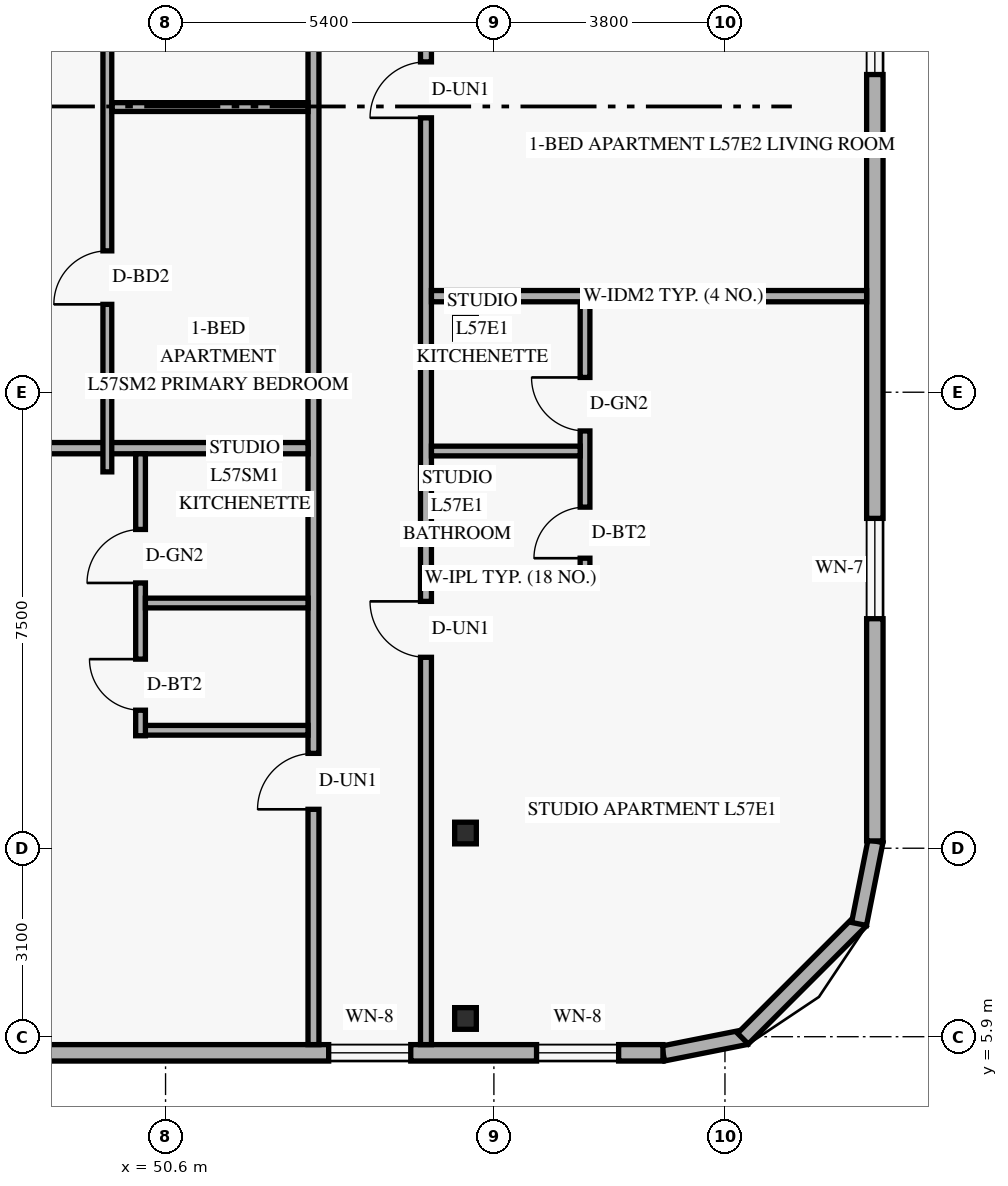
"""IFC4 building model, lengths in metres.
Left out: names, types, materials, properties, quantities, classifications, styles, units other than length and angle.
Written with IfcOpenShell. Run it as: python <this file> out.ifc"""

import sys

from ifc_helpers import new_model, si_unit, direction, frame, frame_2d, origin, origin_2d, place, context, subcontext, project, spatial, rectangle, hollow_rectangle, extrude, element, fill, save


model = new_model("IFC4")
c1 = context("Model", 3, precision=1e-05, world=origin(), true_north=direction((0.0, 1.0)))
c2 = subcontext(c1, "Body", "Model", "MODEL_VIEW")
j1 = project(units=[si_unit("LENGTHUNIT", "METRE"), si_unit("PLANEANGLEUNIT", "RADIAN")], contexts=[c1])
p1 = place(None, origin())
s1 = spatial("IfcSite", under=j1, at=p1, CompositionType="ELEMENT")
p2 = place(p1, origin())
s2 = spatial("IfcBuilding", under=s1, at=p2, CompositionType="ELEMENT")
p3 = place(p2, frame((0.0, 0.0, 220.2)))
s3 = spatial("IfcBuildingStorey", under=s2, at=p3, CompositionType="ELEMENT", Elevation=220.2)
for number, where, z_axis, x_axis in (
    (1, (55.428, 6.2, 0.0), (0.058, 0.0, 0.998), (0.0, 1.0, 0.0)),
    (2, (55.428, 9.25, 0.0), (0.058, 0.0, 0.998), (0.0, 1.0, 0.0)),
    (3, (55.428, 17.55, 0.0), (0.058, 0.0, 0.998), (0.0, 1.0, 0.0)),
):
    element("IfcColumn", number, at=place(p3, frame(where, z_axis=z_axis, x_axis=x_axis)), inside=s3, PredefinedType="COLUMN", context=c2, shape_type="SweptSolid", body=[
        extrude(hollow_rectangle(XDim=0.356, YDim=0.356, WallThickness=0.016, at=origin_2d()), origin(), (0.0, 0.0, 1.0), 3.606),
    ])
p4 = place(p3, frame((58.783, 5.624, 0.0), z_axis=(0.0, 0.0, 1.0), x_axis=(0.980809899341, 0.19496651342, 0.0)))
e4 = element("IfcWall", 4, at=p4, inside=s3, PredefinedType="SOLIDWALL", context=c2, shape_type="SweptSolid", body=[
    extrude(rectangle(XDim=1.389, YDim=0.25, at=frame_2d((0.694, 0.0))), origin(), (0.0, 0.0, 1.0), 3.36),
])
p5 = place(p3, frame((60.095, 5.868, 0.0), z_axis=(0.0, 0.0, 1.0), x_axis=(0.707106781187, 0.707106781187, 0.0)))
e5 = element("IfcWall", 5, at=p5, inside=s3, PredefinedType="SOLIDWALL", context=c2, shape_type="SweptSolid", body=[
    extrude(rectangle(XDim=2.739, YDim=0.25, at=frame_2d((1.37, 0.0))), origin(), (0.0, 0.0, 1.0), 3.36),
])
p6 = place(p3, frame((62.005, 7.754, 0.0), z_axis=(0.0, 0.0, 1.0), x_axis=(0.195135625965, 0.9807762678, 0.0)))
e6 = element("IfcWall", 6, at=p6, inside=s3, PredefinedType="SOLIDWALL", context=c2, shape_type="SweptSolid", body=[
    extrude(rectangle(XDim=1.389, YDim=0.25, at=frame_2d((0.694, 0.0))), origin(), (0.0, 0.0, 1.0), 3.36),
])
p7 = place(p3, frame((25.82, 5.635, 0.0), z_axis=(0.0, 0.0, 1.0), x_axis=(1.0, 0.0, 0.0)))
e7 = element("IfcWall", 7, at=p7, inside=s3, PredefinedType="SOLIDWALL", context=c2, shape_type="SweptSolid", body=[
    extrude(rectangle(XDim=32.96, YDim=0.27, at=frame_2d((16.48, 0.0))), origin(), (0.0, 0.0, 1.0), 3.36),
])
p8 = place(p7, frame((3.795, 0.0, 0.85)))
e8 = element("IfcOpeningElement", 8, at=p8, cuts=e7, PredefinedType="OPENING", context=c2, shape_type="SweptSolid", body=[
    extrude(rectangle(XDim=1.35, YDim=1.55, at=frame_2d((0.675, 0.775))), frame((0.0, 0.145, 0.0), z_axis=(0.0, -1.0, 0.0), x_axis=(1.0, 0.0, 0.0)), (0.0, 0.0, 1.0), 0.29),
])
p9 = place(p7, frame((16.313, 0.0, 0.85)))
e9 = element("IfcOpeningElement", 9, at=p9, cuts=e7, PredefinedType="OPENING", context=c2, shape_type="SweptSolid", body=[
    extrude(rectangle(XDim=1.35, YDim=1.55, at=frame_2d((0.675, 0.775))), frame((0.0, 0.145, 0.0), z_axis=(0.0, -1.0, 0.0), x_axis=(1.0, 0.0, 0.0)), (0.0, 0.0, 1.0), 0.29),
])
p10 = place(p7, frame((27.463, 0.0, 0.85)))
e10 = element("IfcOpeningElement", 10, at=p10, cuts=e7, PredefinedType="OPENING", context=c2, shape_type="SweptSolid", body=[
    extrude(rectangle(XDim=1.35, YDim=1.55, at=frame_2d((0.675, 0.775))), frame((0.0, 0.145, 0.0), z_axis=(0.0, -1.0, 0.0), x_axis=(1.0, 0.0, 0.0)), (0.0, 0.0, 1.0), 0.29),
])
p11 = place(p7, frame((30.881, 0.0, 0.85)))
e11 = element("IfcOpeningElement", 11, at=p11, cuts=e7, PredefinedType="OPENING", context=c2, shape_type="SweptSolid", body=[
    extrude(rectangle(XDim=1.35, YDim=1.55, at=frame_2d((0.675, 0.775))), frame((0.0, 0.145, 0.0), z_axis=(0.0, -1.0, 0.0), x_axis=(1.0, 0.0, 0.0)), (0.0, 0.0, 1.0), 0.29),
])
p12 = place(p3, frame((62.265, 9.12, 0.0), z_axis=(0.0, 0.0, 1.0), x_axis=(0.0, 1.0, 0.0)))
e12 = element("IfcWall", 12, at=p12, inside=s3, PredefinedType="SOLIDWALL", context=c2, shape_type="SweptSolid", body=[
    extrude(rectangle(XDim=29.76, YDim=0.27, at=frame_2d((14.88, 0.0))), origin(), (0.0, 0.0, 1.0), 3.36),
])
p13 = place(p12, frame((3.655, 0.0, 0.85)))
e13 = element("IfcOpeningElement", 13, at=p13, cuts=e12, PredefinedType="OPENING", context=c2, shape_type="SweptSolid", body=[
    extrude(rectangle(XDim=1.65, YDim=1.6, at=frame_2d((0.825, 0.8))), frame((0.0, 0.145, 0.0), z_axis=(0.0, -1.0, 0.0), x_axis=(1.0, 0.0, 0.0)), (0.0, 0.0, 1.0), 0.29),
])
p14 = place(p12, frame((12.605, 0.0, 0.85)))
e14 = element("IfcOpeningElement", 14, at=p14, cuts=e12, PredefinedType="OPENING", context=c2, shape_type="SweptSolid", body=[
    extrude(rectangle(XDim=1.65, YDim=1.6, at=frame_2d((0.825, 0.8))), frame((0.0, 0.145, 0.0), z_axis=(0.0, -1.0, 0.0), x_axis=(1.0, 0.0, 0.0)), (0.0, 0.0, 1.0), 0.29),
])
p15 = place(p12, frame((18.895, 0.0, 0.85)))
e15 = element("IfcOpeningElement", 15, at=p15, cuts=e12, PredefinedType="OPENING", context=c2, shape_type="SweptSolid", body=[
    extrude(rectangle(XDim=1.65, YDim=1.6, at=frame_2d((0.825, 0.8))), frame((0.0, 0.145, 0.0), z_axis=(0.0, -1.0, 0.0), x_axis=(1.0, 0.0, 0.0)), (0.0, 0.0, 1.0), 0.29),
])
p16 = place(p12, frame((24.825, 0.0, 0.85)))
e16 = element("IfcOpeningElement", 16, at=p16, cuts=e12, PredefinedType="OPENING", context=c2, shape_type="SweptSolid", body=[
    extrude(rectangle(XDim=1.65, YDim=1.6, at=frame_2d((0.825, 0.8))), frame((0.0, 0.145, 0.0), z_axis=(0.0, -1.0, 0.0), x_axis=(1.0, 0.0, 0.0)), (0.0, 0.0, 1.0), 0.29),
])
p17 = place(p3, frame((53.033, 5.77, 0.0), z_axis=(0.0, 0.0, 1.0), x_axis=(0.0, 1.0, 0.0)))
e17 = element("IfcWall", 17, at=p17, inside=s3, PredefinedType="STANDARD", context=c2, shape_type="SweptSolid", body=[
    extrude(rectangle(XDim=21.03, YDim=0.18, at=frame_2d((10.515, 0.0))), origin(), (0.0, 0.0, 1.0), 2.803),
])
p18 = place(p17, frame((3.87, 0.0, 0.0)))
e18 = element("IfcOpeningElement", 18, at=p18, cuts=e17, PredefinedType="OPENING", context=c2, shape_type="SweptSolid", body=[
    extrude(rectangle(XDim=0.92, YDim=2.15, at=frame_2d((0.46, 1.075))), frame((0.0, 0.1, 0.0), z_axis=(0.0, -1.0, 0.0), x_axis=(1.0, 0.0, 0.0)), (0.0, 0.0, 1.0), 0.2),
])
p19 = place(p3, frame((54.883, 5.77, 0.0), z_axis=(0.0, 0.0, 1.0), x_axis=(0.0, 1.0, 0.0)))
e19 = element("IfcWall", 19, at=p19, inside=s3, PredefinedType="STANDARD", context=c2, shape_type="SweptSolid", body=[
    extrude(rectangle(XDim=36.46, YDim=0.18, at=frame_2d((18.23, 0.0))), origin(), (0.0, 0.0, 1.0), 2.803),
])
p20 = place(p19, frame((6.37, 0.0, 0.0)))
e20 = element("IfcOpeningElement", 20, at=p20, cuts=e19, PredefinedType="OPENING", context=c2, shape_type="SweptSolid", body=[
    extrude(rectangle(XDim=0.92, YDim=2.15, at=frame_2d((0.46, 1.075))), frame((0.0, 0.1, 0.0), z_axis=(0.0, -1.0, 0.0), x_axis=(1.0, 0.0, 0.0)), (0.0, 0.0, 1.0), 0.2),
])
p21 = place(p19, frame((15.243, 0.0, 0.0)))
e21 = element("IfcOpeningElement", 21, at=p21, cuts=e19, PredefinedType="OPENING", context=c2, shape_type="SweptSolid", body=[
    extrude(rectangle(XDim=0.92, YDim=2.15, at=frame_2d((0.46, 1.075))), frame((0.0, 0.1, 0.0), z_axis=(0.0, -1.0, 0.0), x_axis=(1.0, 0.0, 0.0)), (0.0, 0.0, 1.0), 0.2),
])
p22 = place(p19, frame((26.905, 0.0, 0.0)))
e22 = element("IfcOpeningElement", 22, at=p22, cuts=e19, PredefinedType="OPENING", context=c2, shape_type="SweptSolid", body=[
    extrude(rectangle(XDim=0.92, YDim=2.15, at=frame_2d((0.46, 1.075))), frame((0.0, 0.1, 0.0), z_axis=(0.0, -1.0, 0.0), x_axis=(1.0, 0.0, 0.0)), (0.0, 0.0, 1.0), 0.2),
])
p23 = place(p3, frame((54.973, 13.44, 0.0), z_axis=(0.0, 0.0, 1.0), x_axis=(1.0, 0.0, 0.0)))
e23 = element("IfcWall", 23, at=p23, inside=s3, PredefinedType="PLUMBINGWALL", context=c2, shape_type="SweptSolid", body=[
    extrude(rectangle(XDim=2.606, YDim=0.16, at=frame_2d((1.303, 0.0))), origin(), (0.0, 0.0, 1.0), 2.879),
])
p24 = place(p3, frame((57.499, 13.35, 0.0), z_axis=(0.0, 0.0, 1.0), x_axis=(0.0, 1.0, 0.0)))
e24 = element("IfcWall", 24, at=p24, inside=s3, PredefinedType="PLUMBINGWALL", context=c2, shape_type="SweptSolid", body=[
    extrude(rectangle(XDim=4.73, YDim=0.16, at=frame_2d((2.365, 0.0))), origin(), (0.0, 0.0, 1.0), 3.36),
])
p25 = place(p24, frame((0.42, 0.0, 0.0)))
e25 = element("IfcOpeningElement", 25, at=p25, cuts=e24, PredefinedType="OPENING", context=c2, shape_type="SweptSolid", body=[
    extrude(rectangle(XDim=0.84, YDim=2.12, at=frame_2d((0.42, 1.06))), frame((0.0, 0.09, 0.0), z_axis=(0.0, -1.0, 0.0), x_axis=(1.0, 0.0, 0.0)), (0.0, 0.0, 1.0), 0.18),
])
p26 = place(p24, frame((2.513, 0.0, 0.0)))
e26 = element("IfcOpeningElement", 26, at=p26, cuts=e24, PredefinedType="OPENING", context=c2, shape_type="SweptSolid", body=[
    extrude(rectangle(XDim=0.88, YDim=2.12, at=frame_2d((0.44, 1.06))), frame((0.0, 0.09, 0.0), z_axis=(0.0, -1.0, 0.0), x_axis=(1.0, 0.0, 0.0)), (0.0, 0.0, 1.0), 0.18),
])
p27 = place(p3, frame((54.973, 15.533, 0.0), z_axis=(0.0, 0.0, 1.0), x_axis=(1.0, 0.0, 0.0)))
e27 = element("IfcWall", 27, at=p27, inside=s3, PredefinedType="PLUMBINGWALL", context=c2, shape_type="SweptSolid", body=[
    extrude(rectangle(XDim=2.446, YDim=0.16, at=frame_2d((1.223, 0.0))), origin(), (0.0, 0.0, 1.0), 2.879),
])
p28 = place(p3, frame((54.973, 18.08, 0.0), z_axis=(0.0, 0.0, 1.0), x_axis=(1.0, 0.0, 0.0)))
e28 = element("IfcWall", 28, at=p28, inside=s3, PredefinedType="PARTITIONING", context=c2, shape_type="SweptSolid", body=[
    extrude(rectangle(XDim=7.157, YDim=0.185, at=frame_2d((3.579, 0.0))), origin(), (0.0, 0.0, 1.0), 2.879),
])
p29 = place(p3, frame((38.423, 15.58, 0.0), z_axis=(0.0, 0.0, 1.0), x_axis=(1.0, 0.0, 0.0)))
e29 = element("IfcWall", 29, at=p29, inside=s3, PredefinedType="PARTITIONING", context=c2, shape_type="SweptSolid", body=[
    extrude(rectangle(XDim=14.52, YDim=0.185, at=frame_2d((7.26, 0.0))), origin(), (0.0, 0.0, 1.0), 2.803),
])
p30 = place(p3, frame((50.109, 10.94, 0.0), z_axis=(0.0, 0.0, 1.0), x_axis=(1.0, 0.0, 0.0)))
e30 = element("IfcWall", 30, at=p30, inside=s3, PredefinedType="PLUMBINGWALL", context=c2, shape_type="SweptSolid", body=[
    extrude(rectangle(XDim=2.834, YDim=0.16, at=frame_2d((1.417, 0.0))), origin(), (0.0, 0.0, 1.0), 3.36),
])
p31 = place(p3, frame((50.189, 10.85, 0.0), z_axis=(0.0, 0.0, 1.0), x_axis=(0.0, 1.0, 0.0)))
e31 = element("IfcWall", 31, at=p31, inside=s3, PredefinedType="PLUMBINGWALL", context=c2, shape_type="SweptSolid", body=[
    extrude(rectangle(XDim=4.637, YDim=0.16, at=frame_2d((2.319, 0.0))), origin(), (0.0, 0.0, 1.0), 3.039),
])
p32 = place(p31, frame((0.42, 0.0, 0.0)))
e32 = element("IfcOpeningElement", 32, at=p32, cuts=e31, PredefinedType="OPENING", context=c2, shape_type="SweptSolid", body=[
    extrude(rectangle(XDim=0.84, YDim=2.12, at=frame_2d((0.42, 1.06))), frame((0.0, 0.09, 0.0), z_axis=(0.0, -1.0, 0.0), x_axis=(1.0, 0.0, 0.0)), (0.0, 0.0, 1.0), 0.18),
])
p33 = place(p31, frame((2.513, 0.0, 0.0)))
e33 = element("IfcOpeningElement", 33, at=p33, cuts=e31, PredefinedType="OPENING", context=c2, shape_type="SweptSolid", body=[
    extrude(rectangle(XDim=0.88, YDim=2.12, at=frame_2d((0.44, 1.06))), frame((0.0, 0.09, 0.0), z_axis=(0.0, -1.0, 0.0), x_axis=(1.0, 0.0, 0.0)), (0.0, 0.0, 1.0), 0.18),
])
p34 = place(p3, frame((50.269, 13.033, 0.0), z_axis=(0.0, 0.0, 1.0), x_axis=(1.0, 0.0, 0.0)))
e34 = element("IfcWall", 34, at=p34, inside=s3, PredefinedType="PLUMBINGWALL", context=c2, shape_type="SweptSolid", body=[
    extrude(rectangle(XDim=2.674, YDim=0.16, at=frame_2d((1.337, 0.0))), origin(), (0.0, 0.0, 1.0), 3.36),
])
p35 = place(p3, frame((49.643, 15.19, 0.0), z_axis=(0.0, 0.0, 1.0), x_axis=(0.0, 1.0, 0.0)))
e35 = element("IfcWall", 35, at=p35, inside=s3, PredefinedType="PARTITIONING", context=c2, shape_type="SweptSolid", body=[
    extrude(rectangle(XDim=11.52, YDim=0.145, at=frame_2d((5.76, 0.0))), origin(), (0.0, 0.0, 1.0), 2.803),
])
p36 = place(p35, frame((2.755, 0.0, 0.0)))
e36 = element("IfcOpeningElement", 36, at=p36, cuts=e35, PredefinedType="OPENING", context=c2, shape_type="SweptSolid", body=[
    extrude(rectangle(XDim=0.88, YDim=2.14, at=frame_2d((0.44, 1.07))), frame((0.0, 0.083, 0.0), z_axis=(0.0, -1.0, 0.0), x_axis=(1.0, 0.0, 0.0)), (0.0, 0.0, 1.0), 0.165),
])
p37 = place(p35, frame((6.955, 0.0, 0.0)))
e37 = element("IfcOpeningElement", 37, at=p37, cuts=e35, PredefinedType="OPENING", context=c2, shape_type="SweptSolid", body=[
    extrude(rectangle(XDim=0.88, YDim=2.12, at=frame_2d((0.44, 1.06))), frame((0.0, 0.083, 0.0), z_axis=(0.0, -1.0, 0.0), x_axis=(1.0, 0.0, 0.0)), (0.0, 0.0, 1.0), 0.165),
])
p38 = place(p3, frame((49.723, 21.19, 0.0), z_axis=(0.0, 0.0, 1.0), x_axis=(1.0, 0.0, 0.0)))
e38 = element("IfcWall", 38, at=p38, inside=s3, PredefinedType="PARTITIONING", context=c2, shape_type="SweptSolid", body=[
    extrude(rectangle(XDim=3.22, YDim=0.145, at=frame_2d((1.61, 0.0))), origin(), (0.0, 0.0, 1.0), 3.36),
])
p39 = place(p10, origin())
e39 = element("IfcWindow", 39, at=p39, inside=s3, PartitioningType="SINGLE_PANEL", PredefinedType="WINDOW", context=c2, shape_type="SweptSolid", body=[
    extrude(rectangle(XDim=1.35, YDim=1.55, at=frame_2d((0.675, 0.775))), frame((0.0, 0.03, 0.0), z_axis=(0.0, -1.0, 0.0), x_axis=(1.0, 0.0, 0.0)), (0.0, 0.0, 1.0), 0.06),
])
fill(e10, e39)
p40 = place(p11, origin())
e40 = element("IfcWindow", 40, at=p40, inside=s3, PartitioningType="SINGLE_PANEL", PredefinedType="WINDOW", context=c2, shape_type="SweptSolid", body=[
    extrude(rectangle(XDim=1.35, YDim=1.55, at=frame_2d((0.675, 0.775))), frame((0.0, 0.03, 0.0), z_axis=(0.0, -1.0, 0.0), x_axis=(1.0, 0.0, 0.0)), (0.0, 0.0, 1.0), 0.06),
])
fill(e11, e40)
p41 = place(p13, origin())
e41 = element("IfcWindow", 41, at=p41, inside=s3, PartitioningType="SINGLE_PANEL", PredefinedType="WINDOW", context=c2, shape_type="SweptSolid", body=[
    extrude(rectangle(XDim=1.65, YDim=1.6, at=frame_2d((0.825, 0.8))), frame((0.0, 0.03, 0.0), z_axis=(0.0, -1.0, 0.0), x_axis=(1.0, 0.0, 0.0)), (0.0, 0.0, 1.0), 0.06),
])
fill(e13, e41)
p42 = place(p14, origin())
e42 = element("IfcWindow", 42, at=p42, inside=s3, PartitioningType="SINGLE_PANEL", PredefinedType="WINDOW", context=c2, shape_type="SweptSolid", body=[
    extrude(rectangle(XDim=1.65, YDim=1.6, at=frame_2d((0.825, 0.8))), frame((0.0, 0.03, 0.0), z_axis=(0.0, -1.0, 0.0), x_axis=(1.0, 0.0, 0.0)), (0.0, 0.0, 1.0), 0.06),
])
fill(e14, e42)
p43 = place(p20, origin())
e43 = element("IfcDoor", 43, at=p43, inside=s3, OperationType="SINGLE_SWING_RIGHT", PredefinedType="DOOR", context=c2, shape_type="SweptSolid", body=[
    extrude(rectangle(XDim=0.92, YDim=2.15, at=frame_2d((0.46, 1.075))), frame((0.0, 0.025, 0.0), z_axis=(0.0, -1.0, 0.0), x_axis=(1.0, 0.0, 0.0)), (0.0, 0.0, 1.0), 0.05),
])
fill(e20, e43)
p44 = place(p25, origin())
e44 = element("IfcDoor", 44, at=p44, inside=s3, OperationType="SINGLE_SWING_LEFT", PredefinedType="DOOR", context=c2, shape_type="SweptSolid", body=[
    extrude(rectangle(XDim=0.84, YDim=2.12, at=frame_2d((0.42, 1.06))), frame((0.0, 0.025, 0.0), z_axis=(0.0, -1.0, 0.0), x_axis=(1.0, 0.0, 0.0)), (0.0, 0.0, 1.0), 0.05),
])
fill(e25, e44)
p45 = place(p26, origin())
e45 = element("IfcDoor", 45, at=p45, inside=s3, OperationType="SINGLE_SWING_RIGHT", PredefinedType="DOOR", context=c2, shape_type="SweptSolid", body=[
    extrude(rectangle(XDim=0.88, YDim=2.12, at=frame_2d((0.44, 1.06))), frame((0.0, 0.025, 0.0), z_axis=(0.0, -1.0, 0.0), x_axis=(1.0, 0.0, 0.0)), (0.0, 0.0, 1.0), 0.05),
])
fill(e26, e45)
p46 = place(p21, origin())
e46 = element("IfcDoor", 46, at=p46, inside=s3, OperationType="SINGLE_SWING_LEFT", PredefinedType="DOOR", context=c2, shape_type="SweptSolid", body=[
    extrude(rectangle(XDim=0.92, YDim=2.15, at=frame_2d((0.46, 1.075))), frame((0.0, 0.025, 0.0), z_axis=(0.0, -1.0, 0.0), x_axis=(1.0, 0.0, 0.0)), (0.0, 0.0, 1.0), 0.05),
])
fill(e21, e46)
p47 = place(p18, origin())
e47 = element("IfcDoor", 47, at=p47, inside=s3, OperationType="SINGLE_SWING_LEFT", PredefinedType="DOOR", context=c2, shape_type="SweptSolid", body=[
    extrude(rectangle(XDim=0.92, YDim=2.15, at=frame_2d((0.46, 1.075))), frame((0.0, 0.025, 0.0), z_axis=(0.0, -1.0, 0.0), x_axis=(1.0, 0.0, 0.0)), (0.0, 0.0, 1.0), 0.05),
])
fill(e18, e47)
p48 = place(p32, origin())
e48 = element("IfcDoor", 48, at=p48, inside=s3, OperationType="SINGLE_SWING_RIGHT", PredefinedType="DOOR", context=c2, shape_type="SweptSolid", body=[
    extrude(rectangle(XDim=0.84, YDim=2.12, at=frame_2d((0.42, 1.06))), frame((0.0, 0.025, 0.0), z_axis=(0.0, -1.0, 0.0), x_axis=(1.0, 0.0, 0.0)), (0.0, 0.0, 1.0), 0.05),
])
fill(e32, e48)
p49 = place(p33, origin())
e49 = element("IfcDoor", 49, at=p49, inside=s3, OperationType="SINGLE_SWING_LEFT", PredefinedType="DOOR", context=c2, shape_type="SweptSolid", body=[
    extrude(rectangle(XDim=0.88, YDim=2.12, at=frame_2d((0.44, 1.06))), frame((0.0, 0.025, 0.0), z_axis=(0.0, -1.0, 0.0), x_axis=(1.0, 0.0, 0.0)), (0.0, 0.0, 1.0), 0.05),
])
fill(e33, e49)
p50 = place(p36, origin())
e50 = element("IfcDoor", 50, at=p50, inside=s3, OperationType="SINGLE_SWING_LEFT", PredefinedType="DOOR", context=c2, shape_type="SweptSolid", body=[
    extrude(rectangle(XDim=0.88, YDim=2.14, at=frame_2d((0.44, 1.07))), frame((0.0, 0.025, 0.0), z_axis=(0.0, -1.0, 0.0), x_axis=(1.0, 0.0, 0.0)), (0.0, 0.0, 1.0), 0.05),
])
fill(e36, e50)
save(model, sys.argv[1])
